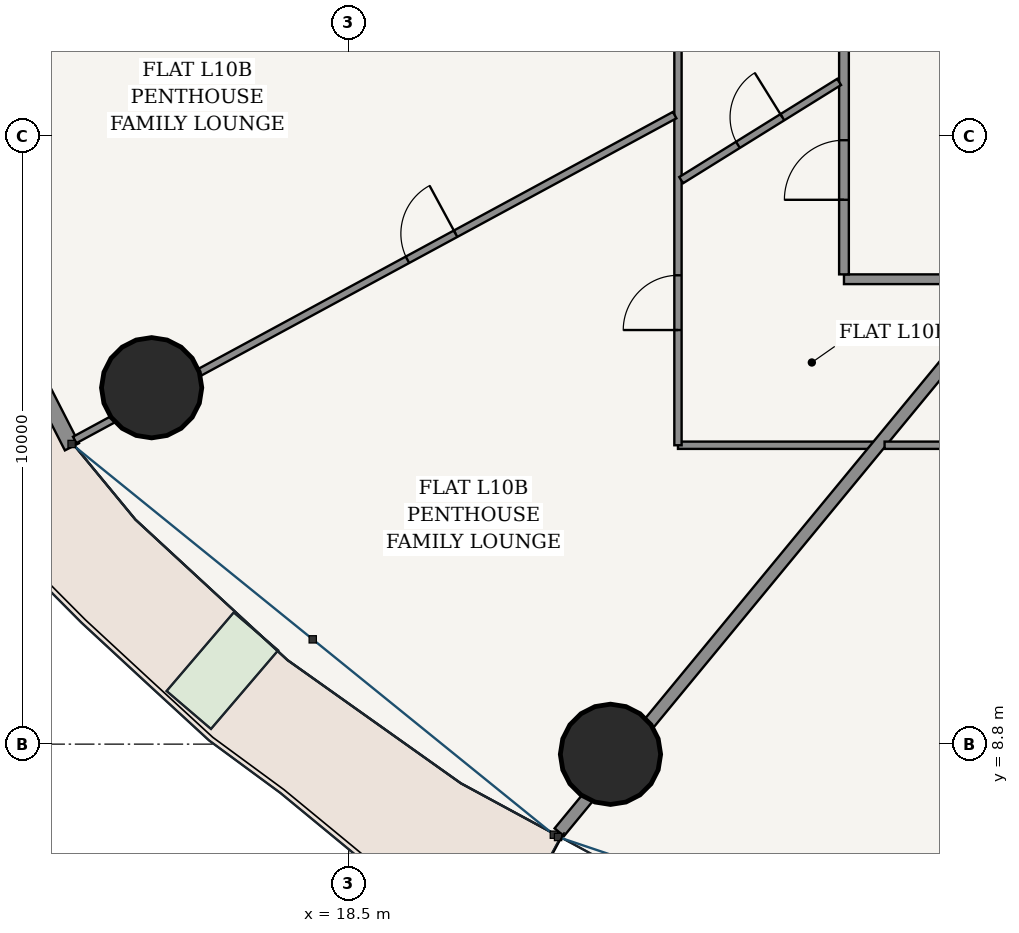
"""IFC4 building model, lengths in metres.
Left out: names, types, materials, properties, quantities, classifications, styles, units other than length and angle.
Written with IfcOpenShell. Run it as: python <this file> out.ifc"""

import sys

from ifc_helpers import new_model, si_unit, direction, frame, frame_2d, origin, origin_2d, place, context, subcontext, project, spatial, rectangle, hollow_circle, extrude, source, transform, mapped, element, fill, save


model = new_model("IFC4")
c1 = context("Model", 3, precision=1e-05, world=origin(), true_north=direction((-0.2419218956, 0.970295726276)))
c2 = subcontext(c1, "Body", "Model", "MODEL_VIEW")
j1 = project(units=[si_unit("LENGTHUNIT", "METRE"), si_unit("PLANEANGLEUNIT", "RADIAN")], contexts=[c1])
p1 = place(None, origin())
s1 = spatial("IfcSite", under=j1, at=p1, CompositionType="ELEMENT")
p2 = place(p1, origin())
s2 = spatial("IfcBuilding", under=s1, at=p2, CompositionType="ELEMENT")
p3 = place(p2, frame((0.0, 0.0, 42.0)))
s3 = spatial("IfcBuildingStorey", under=s2, at=p3, CompositionType="ELEMENT", Elevation=42.0)
for number, where, z_axis, x_axis in (
    (1, (15.259, 14.661, 0.0), (0.0, 0.0, 1.0), (1.0, 0.0, 0.0)),
    (2, (22.805, 8.632, 0.0), (0.0, 0.0, 1.0), (1.0, 0.0, 0.0)),
):
    element("IfcColumn", number, at=place(p3, frame(where, z_axis=z_axis, x_axis=x_axis)), inside=s3, PredefinedType="COLUMN", context=c2, shape_type="SweptSolid", body=[
        extrude(hollow_circle(Radius=0.825, WallThickness=0.05, at=origin_2d()), origin(), (0.0, 0.0, 1.0), 3.6),
    ])
p4 = place(p3, frame((9.55, 22.292, 0.0), z_axis=(0.0, 0.0, 1.0), x_axis=(0.455220575541, -0.890378698984, 0.0)))
e3 = element("IfcWall", 3, at=p4, inside=s3, PredefinedType="SOLIDWALL", context=c2, shape_type="SweptSolid", body=[
    extrude(rectangle(XDim=9.662, YDim=0.26, at=frame_2d((4.831, 0.0))), origin(), (0.0, 0.0, 1.0), 3.32),
])
p5 = place(p4, frame((4.156, 0.0, 0.0)))
e4 = element("IfcOpeningElement", 4, at=p5, cuts=e3, PredefinedType="OPENING", context=c2, shape_type="SweptSolid", body=[
    extrude(rectangle(XDim=1.35, YDim=2.2, at=frame_2d((0.675, 1.1))), frame((0.0, 0.14, 0.0), z_axis=(0.0, -1.0, 0.0), x_axis=(1.0, 0.0, 0.0)), (0.0, 0.0, 1.0), 0.28),
])
p6 = place(p3, frame((26.645, 16.445, 0.0), z_axis=(0.0, 0.0, 1.0), x_axis=(1.0, 0.0, 0.0)))
e5 = element("IfcWall", 5, at=p6, inside=s3, PredefinedType="PARTITIONING", context=c2, shape_type="SweptSolid", body=[
    extrude(rectangle(XDim=22.71, YDim=0.16, at=frame_2d((11.355, 0.0))), origin(), (0.0, 0.0, 1.0), 2.688),
])
p7 = place(p3, frame((26.645, 16.525, 0.0), z_axis=(0.0, 0.0, 1.0), x_axis=(0.0, 1.0, 0.0)))
e6 = element("IfcWall", 6, at=p7, inside=s3, PredefinedType="PARTITIONING", context=c2, shape_type="SweptSolid", body=[
    extrude(rectangle(XDim=20.55, YDim=0.16, at=frame_2d((10.275, 0.0))), origin(), (0.0, 0.0, 1.0), 2.688),
])
p8 = place(p7, frame((1.226, 0.0, 0.0)))
e7 = element("IfcOpeningElement", 7, at=p8, cuts=e6, PredefinedType="OPENING", context=c2, shape_type="SweptSolid", body=[
    extrude(rectangle(XDim=0.98, YDim=2.2, at=frame_2d((0.49, 1.1))), frame((0.0, 0.09, 0.0), z_axis=(0.0, -1.0, 0.0), x_axis=(1.0, 0.0, 0.0)), (0.0, 0.0, 1.0), 0.18),
])
p9 = place(p3, frame((27.109, 13.715, 0.0), z_axis=(0.0, 0.0, 1.0), x_axis=(-1.0, 0.0, 0.0)))
e8 = element("IfcWall", 8, at=p9, inside=s3, PredefinedType="PARTITIONING", context=c2, shape_type="SweptSolid", body=[
    extrude(rectangle(XDim=3.194, YDim=0.12, at=frame_2d((1.597, 0.0))), origin(), (0.0, 0.0, 1.0), 2.688),
])
p10 = place(p3, frame((23.915, 13.715, 0.0), z_axis=(0.0, 0.0, 1.0), x_axis=(0.0, 1.0, 0.0)))
e9 = element("IfcWall", 9, at=p10, inside=s3, PredefinedType="PARTITIONING", context=c2, shape_type="SweptSolid", body=[
    extrude(rectangle(XDim=26.17, YDim=0.12, at=frame_2d((13.085, 0.0))), origin(), (0.0, 0.0, 1.0), 2.688),
])
p11 = place(p10, frame((1.895, 0.0, 0.0)))
e10 = element("IfcOpeningElement", 10, at=p11, cuts=e9, PredefinedType="OPENING", context=c2, shape_type="SweptSolid", body=[
    extrude(rectangle(XDim=0.9, YDim=2.15, at=frame_2d((0.45, 1.075))), frame((0.0, 0.07, 0.0), z_axis=(0.0, -1.0, 0.0), x_axis=(1.0, 0.0, 0.0)), (0.0, 0.0, 1.0), 0.14),
])
p12 = place(p10, frame((11.498, 0.0, 0.0)))
e11 = element("IfcOpeningElement", 11, at=p12, cuts=e9, PredefinedType="OPENING", context=c2, shape_type="SweptSolid", body=[
    extrude(rectangle(XDim=0.9, YDim=2.15, at=frame_2d((0.45, 1.075))), frame((0.0, 0.07, 0.0), z_axis=(0.0, -1.0, 0.0), x_axis=(1.0, 0.0, 0.0)), (0.0, 0.0, 1.0), 0.14),
])
p13 = place(p10, frame((23.831, 0.0, 0.0)))
e12 = element("IfcOpeningElement", 12, at=p13, cuts=e9, PredefinedType="OPENING", context=c2, shape_type="SweptSolid", body=[
    extrude(rectangle(XDim=0.86, YDim=2.15, at=frame_2d((0.43, 1.075))), frame((0.0, 0.07, 0.0), z_axis=(0.0, -1.0, 0.0), x_axis=(1.0, 0.0, 0.0)), (0.0, 0.0, 1.0), 0.14),
])
p14 = place(p3, frame((23.861, 19.144, 0.0), z_axis=(0.0, 0.0, 1.0), x_axis=(-0.879372452045, -0.476134529922, 0.0)))
e13 = element("IfcWall", 13, at=p14, inside=s3, PredefinedType="PARTITIONING", context=c2, shape_type="SweptSolid", body=[
    extrude(rectangle(XDim=11.219, YDim=0.12, at=frame_2d((5.61, 0.0))), origin(), (0.0, 0.0, 1.0), 2.688),
])
p15 = place(p14, frame((4.097, 0.0, 0.0)))
e14 = element("IfcOpeningElement", 14, at=p15, cuts=e13, PredefinedType="OPENING", context=c2, shape_type="SweptSolid", body=[
    extrude(rectangle(XDim=0.9, YDim=2.15, at=frame_2d((0.45, 1.075))), frame((0.0, 0.07, 0.0), z_axis=(0.0, -1.0, 0.0), x_axis=(1.0, 0.0, 0.0)), (0.0, 0.0, 1.0), 0.14),
])
p16 = place(p3, frame((26.565, 19.69, 0.0), z_axis=(0.0, 0.0, 1.0), x_axis=(-0.849229217796, -0.52802437031, 0.0)))
e15 = element("IfcWall", 15, at=p16, inside=s3, PredefinedType="PARTITIONING", context=c2, shape_type="SweptSolid", body=[
    extrude(rectangle(XDim=3.059, YDim=0.12, at=frame_2d((1.529, 0.0))), origin(), (0.0, 0.0, 1.0), 3.32),
])
p17 = place(p16, frame((1.099, 0.0, 0.0)))
e16 = element("IfcOpeningElement", 16, at=p17, cuts=e15, PredefinedType="OPENING", context=c2, shape_type="SweptSolid", body=[
    extrude(rectangle(XDim=0.86, YDim=2.15, at=frame_2d((0.43, 1.075))), frame((0.0, 0.07, 0.0), z_axis=(0.0, -1.0, 0.0), x_axis=(1.0, 0.0, 0.0)), (0.0, 0.0, 1.0), 0.14),
])
p18 = place(p3, frame((29.396, 16.365, 0.0), z_axis=(0.0, 0.0, 1.0), x_axis=(-0.636186165667, -0.771535587393, 0.0)))
e17 = element("IfcWall", 17, at=p18, inside=s3, PredefinedType="PARTITIONING", context=c2, shape_type="SweptSolid", body=[
    extrude(rectangle(XDim=11.683, YDim=0.2, at=frame_2d((5.842, 0.0))), origin(), (0.0, 0.0, 1.0), 2.688),
])
p19 = place(p3, frame((52.085, 13.715, 0.0), z_axis=(0.0, 0.0, 1.0), x_axis=(-1.0, 0.0, 0.0)))
e18 = element("IfcWall", 18, at=p19, inside=s3, PredefinedType="PARTITIONING", context=c2, shape_type="SweptSolid", body=[
    extrude(rectangle(XDim=24.772, YDim=0.12, at=frame_2d((12.386, 0.0))), origin(), (0.0, 0.0, 1.0), 2.688),
])
p20 = place(p19, frame((20.912, 0.0, 0.0)))
e19 = element("IfcOpeningElement", 19, at=p20, cuts=e18, PredefinedType="OPENING", context=c2, shape_type="SweptSolid", body=[
    extrude(rectangle(XDim=0.86, YDim=2.15, at=frame_2d((0.43, 1.075))), frame((0.0, 0.07, 0.0), z_axis=(0.0, -1.0, 0.0), x_axis=(1.0, 0.0, 0.0)), (0.0, 0.0, 1.0), 0.14),
])
p21 = place(p19, frame((13.87, 0.0, 0.0)))
e20 = element("IfcOpeningElement", 20, at=p21, cuts=e18, PredefinedType="OPENING", context=c2, shape_type="SweptSolid", body=[
    extrude(rectangle(XDim=0.9, YDim=2.15, at=frame_2d((0.45, 1.075))), frame((0.0, 0.07, 0.0), z_axis=(0.0, -1.0, 0.0), x_axis=(1.0, 0.0, 0.0)), (0.0, 0.0, 1.0), 0.14),
])
m1 = source(origin(), c2, "Body", "SweptSolid", [
    extrude(rectangle(XDim=0.98, YDim=2.2, at=frame_2d((0.49, 1.1))), frame((0.0, 0.025, 0.0), z_axis=(0.0, -1.0, 0.0), x_axis=(1.0, 0.0, 0.0)), (0.0, 0.0, 1.0), 0.05),
])
p22 = place(p8, origin())
e21 = element("IfcDoor", 21, at=p22, inside=s3, OperationType="SINGLE_SWING_LEFT", PredefinedType="DOOR", context=c2, shape_type="MappedRepresentation", body=[
    mapped(m1, transform((0.0, 0.0, 0.0), scale=1.0)),
])
fill(e7, e21)
m2 = source(origin(), c2, "Body", "SweptSolid", [
    extrude(rectangle(XDim=0.86, YDim=2.15, at=frame_2d((0.43, 1.075))), frame((0.0, 0.025, 0.0), z_axis=(0.0, -1.0, 0.0), x_axis=(1.0, 0.0, 0.0)), (0.0, 0.0, 1.0), 0.05),
])
p23 = place(p17, frame((0.86, 0.0, 0.0), z_axis=(0.0, 0.0, 1.0), x_axis=(-1.0, 0.0, 0.0)))
e22 = element("IfcDoor", 22, at=p23, inside=s3, OperationType="SINGLE_SWING_RIGHT", PredefinedType="DOOR", context=c2, shape_type="MappedRepresentation", body=[
    mapped(m2, transform((0.0, 0.0, 0.0), scale=1.0)),
])
fill(e16, e22)
m3 = source(origin(), c2, "Body", "SweptSolid", [
    extrude(rectangle(XDim=0.9, YDim=2.15, at=frame_2d((0.45, 1.075))), frame((0.0, 0.025, 0.0), z_axis=(0.0, -1.0, 0.0), x_axis=(1.0, 0.0, 0.0)), (0.0, 0.0, 1.0), 0.05),
])
p24 = place(p11, origin())
e23 = element("IfcDoor", 23, at=p24, inside=s3, OperationType="SINGLE_SWING_LEFT", PredefinedType="DOOR", context=c2, shape_type="MappedRepresentation", body=[
    mapped(m3, transform((0.0, 0.0, 0.0), scale=1.0)),
])
fill(e10, e23)
p25 = place(p15, frame((0.9, 0.0, 0.0), z_axis=(0.0, 0.0, 1.0), x_axis=(-1.0, 0.0, 0.0)))
e24 = element("IfcDoor", 24, at=p25, inside=s3, OperationType="SINGLE_SWING_RIGHT", PredefinedType="DOOR", context=c2, shape_type="MappedRepresentation", body=[
    mapped(m3, transform((0.0, 0.0, 0.0), scale=1.0)),
])
fill(e14, e24)
save(model, sys.argv[1])
